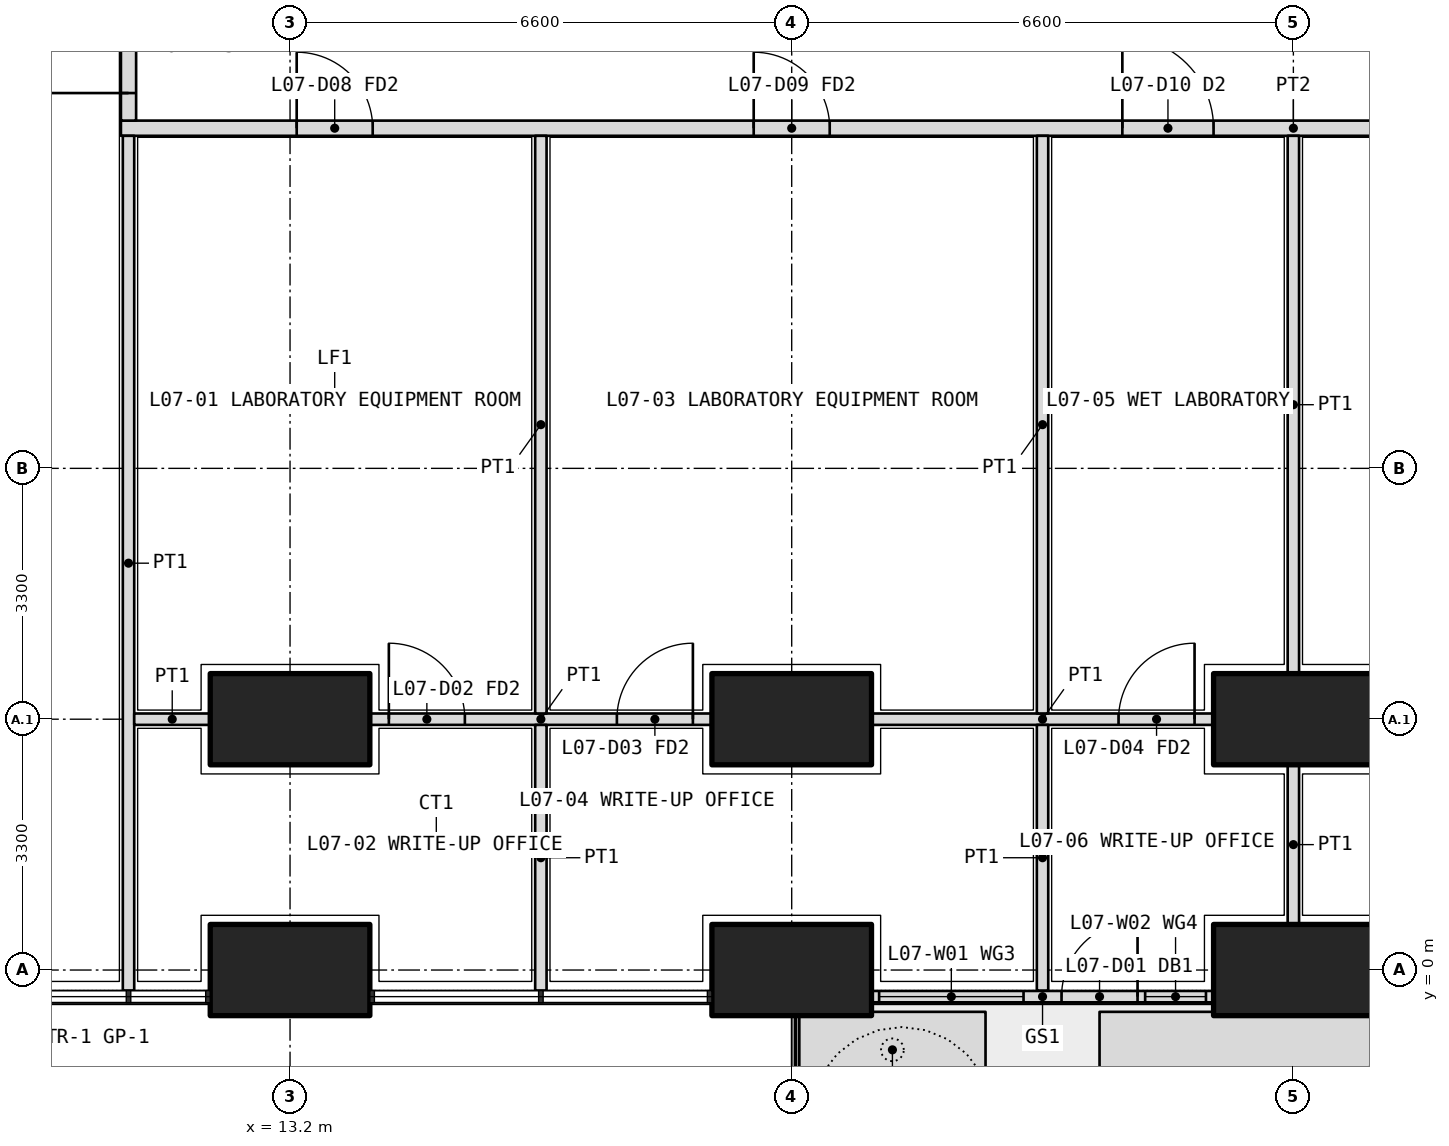
"""IFC4 building model, lengths in metres.
Left out: names, types, materials, properties, quantities, classifications, styles, units other than length and angle.
Written with IfcOpenShell. Run it as: python <this file> out.ifc"""

import sys

from ifc_helpers import new_model, si_unit, direction, frame, frame_2d, origin, origin_2d, place, context, subcontext, project, spatial, polyline, rectangle, outline, extrude, element, fill, save


model = new_model("IFC4")
c1 = context("Model", 3, precision=1e-05, world=origin(), true_north=direction((0.0, 1.0)))
c2 = subcontext(c1, "Body", "Model", "MODEL_VIEW")
j1 = project(units=[si_unit("LENGTHUNIT", "METRE"), si_unit("PLANEANGLEUNIT", "RADIAN")], contexts=[c1])
p1 = place(None, origin())
s1 = spatial("IfcSite", under=j1, at=p1, CompositionType="ELEMENT")
p2 = place(p1, origin())
s2 = spatial("IfcBuilding", under=s1, at=p2, CompositionType="ELEMENT")
p3 = place(p2, frame((0.0, 0.0, 33.9)))
s3 = spatial("IfcBuildingStorey", under=s2, at=p3, CompositionType="ELEMENT", Elevation=33.9)
for number, where, z_axis, x_axis in (
    (1, (13.2, 0.0, 0.0), (0.0, 0.0, 1.0), (1.0, 0.0, 0.0)),
    (2, (19.8, 0.0, 0.0), (0.0, 0.0, 1.0), (1.0, 0.0, 0.0)),
    (3, (26.4, 0.0, 0.0), (0.0, 0.0, 1.0), (1.0, 0.0, 0.0)),
    (4, (13.2, 3.3, 0.0), (0.0, 0.0, 1.0), (1.0, 0.0, 0.0)),
    (5, (19.8, 3.3, 0.0), (0.0, 0.0, 1.0), (1.0, 0.0, 0.0)),
    (6, (26.4, 3.3, 0.0), (0.0, 0.0, 1.0), (1.0, 0.0, 0.0)),
):
    element("IfcColumn", number, at=place(p3, frame(where, z_axis=z_axis, x_axis=x_axis)), inside=s3, PredefinedType="COLUMN", context=c2, shape_type="SweptSolid", body=[
        extrude(rectangle(XDim=2.1, YDim=1.2, at=origin_2d()), origin(), (0.0, 0.0, 1.0), 4.2),
    ])
p4 = place(p3, origin())
e7 = element("IfcWall", 7, at=p4, inside=s3, PredefinedType="USERDEFINED", context=c2, shape_type="SweptSolid", body=[
    extrude(outline(polyline([(19.9, -1.55), (22.35, -1.55), (22.35, -0.55), (19.9, -0.55), (19.9, -1.55)]), holes=[polyline([(20.05, -1.4), (22.2, -1.4), (22.2, -0.7), (20.05, -0.7), (20.05, -1.4)])]), origin(), (0.0, 0.0, 1.0), 1.05),
])
p5 = place(p3, origin())
e8 = element("IfcWall", 8, at=p5, inside=s3, PredefinedType="USERDEFINED", context=c2, shape_type="SweptSolid", body=[
    extrude(outline(polyline([(23.85, -1.55), (32.9, -1.55), (32.9, -0.55), (23.85, -0.55), (23.85, -1.55)]), holes=[polyline([(24.0, -1.4), (32.75, -1.4), (32.75, -0.7), (24.0, -0.7), (24.0, -1.4)])]), origin(), (0.0, 0.0, 1.0), 1.05),
])
p6 = place(p3, frame((20.85, -0.35, 0.0), z_axis=(0.0, 0.0, 1.0), x_axis=(1.0, 0.0, 0.0)))
e9 = element("IfcWall", 9, at=p6, inside=s3, PredefinedType="SOLIDWALL", context=c2, shape_type="SweptSolid", body=[
    extrude(rectangle(XDim=4.5, YDim=0.15, at=frame_2d((2.25, 0.0))), origin(), (0.0, 0.0, 1.0), 2.7),
])
p7 = place(p6, frame((2.5, 0.0, 0.0)))
e10 = element("IfcOpeningElement", 10, at=p7, cuts=e9, PredefinedType="OPENING", context=c2, shape_type="SweptSolid", body=[
    extrude(rectangle(XDim=1.0, YDim=2.4, at=frame_2d((0.5, 1.2))), frame((0.0, 0.085, 0.0), z_axis=(0.0, -1.0, 0.0), x_axis=(1.0, 0.0, 0.0)), (0.0, 0.0, 1.0), 0.17),
])
p8 = place(p6, frame((0.1, 0.0, 0.1)))
e11 = element("IfcOpeningElement", 11, at=p8, cuts=e9, PredefinedType="OPENING", context=c2, shape_type="SweptSolid", body=[
    extrude(rectangle(XDim=1.9, YDim=2.3, at=frame_2d((0.95, 1.15))), frame((0.0, 0.085, 0.0), z_axis=(0.0, -1.0, 0.0), x_axis=(1.0, 0.0, 0.0)), (0.0, 0.0, 1.0), 0.17),
])
p9 = place(p6, frame((3.6, 0.0, 0.1)))
e12 = element("IfcOpeningElement", 12, at=p9, cuts=e9, PredefinedType="OPENING", context=c2, shape_type="SweptSolid", body=[
    extrude(rectangle(XDim=0.8, YDim=2.3, at=frame_2d((0.4, 1.15))), frame((0.0, 0.085, 0.0), z_axis=(0.0, -1.0, 0.0), x_axis=(1.0, 0.0, 0.0)), (0.0, 0.0, 1.0), 0.17),
])
p10 = place(p3, frame((10.975, 11.075, 0.0), z_axis=(0.0, 0.0, 1.0), x_axis=(1.0, 0.0, 0.0)))
e13 = element("IfcWall", 13, at=p10, inside=s3, PredefinedType="PARTITIONING", context=c2, shape_type="SweptSolid", body=[
    extrude(rectangle(XDim=30.85, YDim=0.2, at=frame_2d((15.425, 0.0))), origin(), (0.0, 0.0, 1.0), 2.85),
])
p11 = place(p10, frame((2.312, 0.0, 0.0)))
e14 = element("IfcOpeningElement", 14, at=p11, cuts=e13, PredefinedType="OPENING", context=c2, shape_type="SweptSolid", body=[
    extrude(rectangle(XDim=1.0, YDim=2.1, at=frame_2d((0.5, 1.05))), frame((0.0, 0.11, 0.0), z_axis=(0.0, -1.0, 0.0), x_axis=(1.0, 0.0, 0.0)), (0.0, 0.0, 1.0), 0.22),
])
p12 = place(p10, frame((8.325, 0.0, 0.0)))
e15 = element("IfcOpeningElement", 15, at=p12, cuts=e13, PredefinedType="OPENING", context=c2, shape_type="SweptSolid", body=[
    extrude(rectangle(XDim=1.0, YDim=2.1, at=frame_2d((0.5, 1.05))), frame((0.0, 0.11, 0.0), z_axis=(0.0, -1.0, 0.0), x_axis=(1.0, 0.0, 0.0)), (0.0, 0.0, 1.0), 0.22),
])
p13 = place(p10, frame((13.175, 0.0, 0.0)))
e16 = element("IfcOpeningElement", 16, at=p13, cuts=e13, PredefinedType="OPENING", context=c2, shape_type="SweptSolid", body=[
    extrude(rectangle(XDim=1.2, YDim=2.1, at=frame_2d((0.6, 1.05))), frame((0.0, 0.11, 0.0), z_axis=(0.0, -1.0, 0.0), x_axis=(1.0, 0.0, 0.0)), (0.0, 0.0, 1.0), 0.22),
])
p14 = place(p10, frame((19.875, 0.0, 0.0)))
e17 = element("IfcOpeningElement", 17, at=p14, cuts=e13, PredefinedType="OPENING", context=c2, shape_type="SweptSolid", body=[
    extrude(rectangle(XDim=1.0, YDim=2.1, at=frame_2d((0.5, 1.05))), frame((0.0, 0.11, 0.0), z_axis=(0.0, -1.0, 0.0), x_axis=(1.0, 0.0, 0.0)), (0.0, 0.0, 1.0), 0.22),
])
p15 = place(p10, frame((27.538, 0.0, 0.0)))
e18 = element("IfcOpeningElement", 18, at=p15, cuts=e13, PredefinedType="OPENING", context=c2, shape_type="SweptSolid", body=[
    extrude(rectangle(XDim=1.0, YDim=2.1, at=frame_2d((0.5, 1.05))), frame((0.0, 0.11, 0.0), z_axis=(0.0, -1.0, 0.0), x_axis=(1.0, 0.0, 0.0)), (0.0, 0.0, 1.0), 0.22),
])
p16 = place(p3, frame((11.075, 11.175, 0.0), z_axis=(0.0, 0.0, 1.0), x_axis=(0.0, 1.0, 0.0)))
e19 = element("IfcWall", 19, at=p16, inside=s3, PredefinedType="PARTITIONING", context=c2, shape_type="SweptSolid", body=[
    extrude(rectangle(XDim=23.85, YDim=0.2, at=frame_2d((11.925, 0.0))), origin(), (0.0, 0.0, 1.0), 2.85),
])
p17 = place(p16, frame((0.363, 0.0, 0.0)))
e20 = element("IfcOpeningElement", 20, at=p17, cuts=e19, PredefinedType="OPENING", context=c2, shape_type="SweptSolid", body=[
    extrude(rectangle(XDim=1.2, YDim=2.1, at=frame_2d((0.6, 1.05))), frame((0.0, 0.11, 0.0), z_axis=(0.0, -1.0, 0.0), x_axis=(1.0, 0.0, 0.0)), (0.0, 0.0, 1.0), 0.22),
])
p18 = place(p16, frame((2.575, 0.0, 0.0)))
e21 = element("IfcOpeningElement", 21, at=p18, cuts=e19, PredefinedType="OPENING", context=c2, shape_type="SweptSolid", body=[
    extrude(rectangle(XDim=1.0, YDim=2.1, at=frame_2d((0.5, 1.05))), frame((0.0, 0.11, 0.0), z_axis=(0.0, -1.0, 0.0), x_axis=(1.0, 0.0, 0.0)), (0.0, 0.0, 1.0), 0.22),
])
p19 = place(p16, frame((5.65, 0.0, 0.0)))
e22 = element("IfcOpeningElement", 22, at=p19, cuts=e19, PredefinedType="OPENING", context=c2, shape_type="SweptSolid", body=[
    extrude(rectangle(XDim=0.9, YDim=2.1, at=frame_2d((0.45, 1.05))), frame((0.0, 0.11, 0.0), z_axis=(0.0, -1.0, 0.0), x_axis=(1.0, 0.0, 0.0)), (0.0, 0.0, 1.0), 0.22),
])
p20 = place(p16, frame((9.5, 0.0, 0.0)))
e23 = element("IfcOpeningElement", 23, at=p20, cuts=e19, PredefinedType="OPENING", context=c2, shape_type="SweptSolid", body=[
    extrude(rectangle(XDim=0.9, YDim=2.1, at=frame_2d((0.45, 1.05))), frame((0.0, 0.11, 0.0), z_axis=(0.0, -1.0, 0.0), x_axis=(1.0, 0.0, 0.0)), (0.0, 0.0, 1.0), 0.22),
])
p21 = place(p16, frame((13.025, 0.0, 0.0)))
e24 = element("IfcOpeningElement", 24, at=p21, cuts=e19, PredefinedType="OPENING", context=c2, shape_type="SweptSolid", body=[
    extrude(rectangle(XDim=1.0, YDim=2.1, at=frame_2d((0.5, 1.05))), frame((0.0, 0.11, 0.0), z_axis=(0.0, -1.0, 0.0), x_axis=(1.0, 0.0, 0.0)), (0.0, 0.0, 1.0), 0.22),
])
p22 = place(p16, frame((16.375, 0.0, 0.0)))
e25 = element("IfcOpeningElement", 25, at=p22, cuts=e19, PredefinedType="OPENING", context=c2, shape_type="SweptSolid", body=[
    extrude(rectangle(XDim=1.0, YDim=2.1, at=frame_2d((0.5, 1.05))), frame((0.0, 0.11, 0.0), z_axis=(0.0, -1.0, 0.0), x_axis=(1.0, 0.0, 0.0)), (0.0, 0.0, 1.0), 0.22),
])
p23 = place(p16, frame((19.675, 0.0, 0.0)))
e26 = element("IfcOpeningElement", 26, at=p23, cuts=e19, PredefinedType="OPENING", context=c2, shape_type="SweptSolid", body=[
    extrude(rectangle(XDim=1.0, YDim=2.1, at=frame_2d((0.5, 1.05))), frame((0.0, 0.11, 0.0), z_axis=(0.0, -1.0, 0.0), x_axis=(1.0, 0.0, 0.0)), (0.0, 0.0, 1.0), 0.22),
])
p24 = place(p16, frame((22.387, 0.0, 0.0)))
e27 = element("IfcOpeningElement", 27, at=p24, cuts=e19, PredefinedType="OPENING", context=c2, shape_type="SweptSolid", body=[
    extrude(rectangle(XDim=1.0, YDim=2.1, at=frame_2d((0.5, 1.05))), frame((0.0, 0.11, 0.0), z_axis=(0.0, -1.0, 0.0), x_axis=(1.0, 0.0, 0.0)), (0.0, 0.0, 1.0), 0.22),
])
p25 = place(p3, frame((11.075, -0.27, 0.0), z_axis=(0.0, 0.0, 1.0), x_axis=(0.0, 1.0, 0.0)))
e28 = element("IfcWall", 28, at=p25, inside=s3, PredefinedType="PARTITIONING", context=c2, shape_type="SweptSolid", body=[
    extrude(rectangle(XDim=11.245, YDim=0.15, at=frame_2d((5.623, 0.0))), origin(), (0.0, 0.0, 1.0), 2.7),
])
p26 = place(p3, frame((11.15, 3.3, 0.0), z_axis=(0.0, 0.0, 1.0), x_axis=(1.0, 0.0, 0.0)))
e29 = element("IfcWall", 29, at=p26, inside=s3, PredefinedType="PARTITIONING", context=c2, shape_type="SweptSolid", body=[
    extrude(rectangle(XDim=1.0, YDim=0.15, at=frame_2d((0.5, 0.0))), origin(), (0.0, 0.0, 1.0), 3.9),
])
p27 = place(p3, frame((14.25, 3.3, 0.0), z_axis=(0.0, 0.0, 1.0), x_axis=(1.0, 0.0, 0.0)))
e30 = element("IfcWall", 30, at=p27, inside=s3, PredefinedType="PARTITIONING", context=c2, shape_type="SweptSolid", body=[
    extrude(rectangle(XDim=4.5, YDim=0.15, at=frame_2d((2.25, 0.0))), origin(), (0.0, 0.0, 1.0), 3.9),
])
p28 = place(p27, frame((0.25, 0.0, 0.0)))
e31 = element("IfcOpeningElement", 31, at=p28, cuts=e30, PredefinedType="OPENING", context=c2, shape_type="SweptSolid", body=[
    extrude(rectangle(XDim=1.0, YDim=2.1, at=frame_2d((0.5, 1.05))), frame((0.0, 0.085, 0.0), z_axis=(0.0, -1.0, 0.0), x_axis=(1.0, 0.0, 0.0)), (0.0, 0.0, 1.0), 0.17),
])
p29 = place(p27, frame((3.25, 0.0, 0.0)))
e32 = element("IfcOpeningElement", 32, at=p29, cuts=e30, PredefinedType="OPENING", context=c2, shape_type="SweptSolid", body=[
    extrude(rectangle(XDim=1.0, YDim=2.1, at=frame_2d((0.5, 1.05))), frame((0.0, 0.085, 0.0), z_axis=(0.0, -1.0, 0.0), x_axis=(1.0, 0.0, 0.0)), (0.0, 0.0, 1.0), 0.17),
])
p30 = place(p3, frame((20.85, 3.3, 0.0), z_axis=(0.0, 0.0, 1.0), x_axis=(1.0, 0.0, 0.0)))
e33 = element("IfcWall", 33, at=p30, inside=s3, PredefinedType="PARTITIONING", context=c2, shape_type="SweptSolid", body=[
    extrude(rectangle(XDim=4.5, YDim=0.15, at=frame_2d((2.25, 0.0))), origin(), (0.0, 0.0, 1.0), 3.9),
])
p31 = place(p30, frame((3.25, 0.0, 0.0)))
e34 = element("IfcOpeningElement", 34, at=p31, cuts=e33, PredefinedType="OPENING", context=c2, shape_type="SweptSolid", body=[
    extrude(rectangle(XDim=1.0, YDim=2.1, at=frame_2d((0.5, 1.05))), frame((0.0, 0.085, 0.0), z_axis=(0.0, -1.0, 0.0), x_axis=(1.0, 0.0, 0.0)), (0.0, 0.0, 1.0), 0.17),
])
p32 = place(p3, frame((16.5, -0.27, 0.0), z_axis=(0.0, 0.0, 1.0), x_axis=(0.0, 1.0, 0.0)))
e35 = element("IfcWall", 35, at=p32, inside=s3, PredefinedType="PARTITIONING", context=c2, shape_type="SweptSolid", body=[
    extrude(rectangle(XDim=3.495, YDim=0.15, at=frame_2d((1.748, 0.0))), origin(), (0.0, 0.0, 1.0), 2.7),
])
p33 = place(p3, frame((16.5, 3.375, 0.0), z_axis=(0.0, 0.0, 1.0), x_axis=(0.0, 1.0, 0.0)))
e36 = element("IfcWall", 36, at=p33, inside=s3, PredefinedType="PARTITIONING", context=c2, shape_type="SweptSolid", body=[
    extrude(rectangle(XDim=7.6, YDim=0.15, at=frame_2d((3.8, 0.0))), origin(), (0.0, 0.0, 1.0), 3.9),
])
p34 = place(p3, frame((23.1, -0.27, 0.0), z_axis=(0.0, 0.0, 1.0), x_axis=(0.0, 1.0, 0.0)))
e37 = element("IfcWall", 37, at=p34, inside=s3, PredefinedType="PARTITIONING", context=c2, shape_type="SweptSolid", body=[
    extrude(rectangle(XDim=3.495, YDim=0.15, at=frame_2d((1.748, 0.0))), origin(), (0.0, 0.0, 1.0), 2.7),
])
p35 = place(p3, frame((23.1, 3.375, 0.0), z_axis=(0.0, 0.0, 1.0), x_axis=(0.0, 1.0, 0.0)))
e38 = element("IfcWall", 38, at=p35, inside=s3, PredefinedType="PARTITIONING", context=c2, shape_type="SweptSolid", body=[
    extrude(rectangle(XDim=7.6, YDim=0.15, at=frame_2d((3.8, 0.0))), origin(), (0.0, 0.0, 1.0), 3.9),
])
p36 = place(p3, frame((26.4, 0.6, 0.0), z_axis=(0.0, 0.0, 1.0), x_axis=(0.0, 1.0, 0.0)))
e39 = element("IfcWall", 39, at=p36, inside=s3, PredefinedType="PARTITIONING", context=c2, shape_type="SweptSolid", body=[
    extrude(rectangle(XDim=2.1, YDim=0.15, at=frame_2d((1.05, 0.0))), origin(), (0.0, 0.0, 1.0), 2.85),
])
p37 = place(p3, frame((26.4, 3.9, 0.0), z_axis=(0.0, 0.0, 1.0), x_axis=(0.0, 1.0, 0.0)))
e40 = element("IfcWall", 40, at=p37, inside=s3, PredefinedType="PARTITIONING", context=c2, shape_type="SweptSolid", body=[
    extrude(rectangle(XDim=7.075, YDim=0.15, at=frame_2d((3.538, 0.0))), origin(), (0.0, 0.0, 1.0), 2.85),
])
p38 = place(p7, origin())
e41 = element("IfcDoor", 41, at=p38, inside=s3, OperationType="SINGLE_SWING_RIGHT", PredefinedType="DOOR", context=c2, shape_type="SweptSolid", body=[
    extrude(rectangle(XDim=1.0, YDim=2.4, at=frame_2d((0.5, 1.2))), frame((0.0, 0.025, 0.0), z_axis=(0.0, -1.0, 0.0), x_axis=(1.0, 0.0, 0.0)), (0.0, 0.0, 1.0), 0.05),
])
fill(e10, e41)
p39 = place(p8, origin())
e42 = element("IfcWindow", 42, at=p39, inside=s3, PartitioningType="SINGLE_PANEL", PredefinedType="WINDOW", context=c2, shape_type="SweptSolid", body=[
    extrude(rectangle(XDim=1.9, YDim=2.3, at=frame_2d((0.95, 1.15))), frame((0.0, 0.03, 0.0), z_axis=(0.0, -1.0, 0.0), x_axis=(1.0, 0.0, 0.0)), (0.0, 0.0, 1.0), 0.06),
])
fill(e11, e42)
p40 = place(p9, origin())
e43 = element("IfcWindow", 43, at=p40, inside=s3, PartitioningType="SINGLE_PANEL", PredefinedType="WINDOW", context=c2, shape_type="SweptSolid", body=[
    extrude(rectangle(XDim=0.8, YDim=2.3, at=frame_2d((0.4, 1.15))), frame((0.0, 0.03, 0.0), z_axis=(0.0, -1.0, 0.0), x_axis=(1.0, 0.0, 0.0)), (0.0, 0.0, 1.0), 0.06),
])
fill(e12, e43)
p41 = place(p11, origin())
e44 = element("IfcDoor", 44, at=p41, inside=s3, OperationType="SINGLE_SWING_LEFT", PredefinedType="DOOR", context=c2, shape_type="SweptSolid", body=[
    extrude(rectangle(XDim=1.0, YDim=2.1, at=frame_2d((0.5, 1.05))), frame((0.0, 0.025, 0.0), z_axis=(0.0, -1.0, 0.0), x_axis=(1.0, 0.0, 0.0)), (0.0, 0.0, 1.0), 0.05),
])
fill(e14, e44)
p42 = place(p28, origin())
e45 = element("IfcDoor", 45, at=p42, inside=s3, OperationType="SINGLE_SWING_LEFT", PredefinedType="DOOR", context=c2, shape_type="SweptSolid", body=[
    extrude(rectangle(XDim=1.0, YDim=2.1, at=frame_2d((0.5, 1.05))), frame((0.0, 0.025, 0.0), z_axis=(0.0, -1.0, 0.0), x_axis=(1.0, 0.0, 0.0)), (0.0, 0.0, 1.0), 0.05),
])
fill(e31, e45)
p43 = place(p12, origin())
e46 = element("IfcDoor", 46, at=p43, inside=s3, OperationType="SINGLE_SWING_LEFT", PredefinedType="DOOR", context=c2, shape_type="SweptSolid", body=[
    extrude(rectangle(XDim=1.0, YDim=2.1, at=frame_2d((0.5, 1.05))), frame((0.0, 0.025, 0.0), z_axis=(0.0, -1.0, 0.0), x_axis=(1.0, 0.0, 0.0)), (0.0, 0.0, 1.0), 0.05),
])
fill(e15, e46)
p44 = place(p29, origin())
e47 = element("IfcDoor", 47, at=p44, inside=s3, OperationType="SINGLE_SWING_RIGHT", PredefinedType="DOOR", context=c2, shape_type="SweptSolid", body=[
    extrude(rectangle(XDim=1.0, YDim=2.1, at=frame_2d((0.5, 1.05))), frame((0.0, 0.025, 0.0), z_axis=(0.0, -1.0, 0.0), x_axis=(1.0, 0.0, 0.0)), (0.0, 0.0, 1.0), 0.05),
])
fill(e32, e47)
p45 = place(p13, origin())
e48 = element("IfcDoor", 48, at=p45, inside=s3, OperationType="DOUBLE_DOOR_SINGLE_SWING", PredefinedType="DOOR", context=c2, shape_type="SweptSolid", body=[
    extrude(rectangle(XDim=1.2, YDim=2.1, at=frame_2d((0.6, 1.05))), frame((0.0, 0.025, 0.0), z_axis=(0.0, -1.0, 0.0), x_axis=(1.0, 0.0, 0.0)), (0.0, 0.0, 1.0), 0.05),
])
fill(e16, e48)
p46 = place(p31, origin())
e49 = element("IfcDoor", 49, at=p46, inside=s3, OperationType="SINGLE_SWING_RIGHT", PredefinedType="DOOR", context=c2, shape_type="SweptSolid", body=[
    extrude(rectangle(XDim=1.0, YDim=2.1, at=frame_2d((0.5, 1.05))), frame((0.0, 0.025, 0.0), z_axis=(0.0, -1.0, 0.0), x_axis=(1.0, 0.0, 0.0)), (0.0, 0.0, 1.0), 0.05),
])
fill(e34, e49)
p47 = place(p17, origin())
e50 = element("IfcDoor", 50, at=p47, inside=s3, OperationType="DOUBLE_DOOR_SINGLE_SWING", PredefinedType="DOOR", context=c2, shape_type="SweptSolid", body=[
    extrude(rectangle(XDim=1.2, YDim=2.1, at=frame_2d((0.6, 1.05))), frame((0.0, 0.025, 0.0), z_axis=(0.0, -1.0, 0.0), x_axis=(1.0, 0.0, 0.0)), (0.0, 0.0, 1.0), 0.05),
])
fill(e20, e50)
save(model, sys.argv[1])
